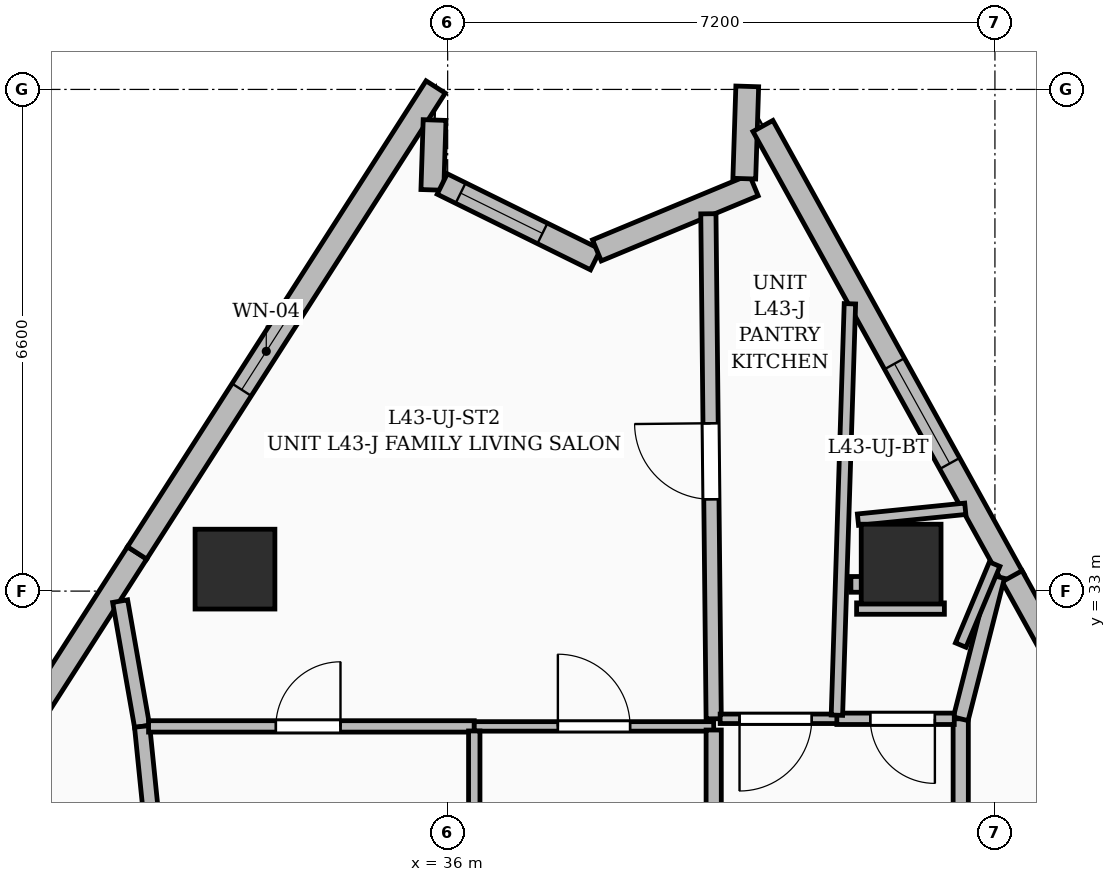
"""IFC4 building model, lengths in metres.
Left out: names, types, materials, properties, quantities, classifications, styles, units other than length and angle.
Written with IfcOpenShell. Run it as: python <this file> out.ifc"""

import sys

from ifc_helpers import new_model, si_unit, direction, frame, frame_2d, origin, origin_2d, place, context, subcontext, project, spatial, rectangle, extrude, element, fill, save


model = new_model("IFC4")
c1 = context("Model", 3, precision=1e-05, world=origin(), true_north=direction((0.0, 1.0)))
c2 = subcontext(c1, "Body", "Model", "MODEL_VIEW")
j1 = project(units=[si_unit("LENGTHUNIT", "METRE"), si_unit("PLANEANGLEUNIT", "RADIAN")], contexts=[c1])
p1 = place(None, origin())
s1 = spatial("IfcSite", under=j1, at=p1, CompositionType="ELEMENT")
p2 = place(p1, origin())
s2 = spatial("IfcBuilding", under=s1, at=p2, CompositionType="ELEMENT")
p3 = place(p2, frame((0.0, 0.0, 168.0)))
s3 = spatial("IfcBuildingStorey", under=s2, at=p3, CompositionType="ELEMENT", Elevation=168.0)
for number, where, z_axis, x_axis in (
    (1, (41.966, 33.355, 0.0), (0.0, 0.0, 1.0), (1.0, 0.0, 0.0)),
    (2, (33.202, 33.289, 0.0), (0.0, 0.0, 1.0), (1.0, 0.0, 0.0)),
):
    element("IfcColumn", number, at=place(p3, frame(where, z_axis=z_axis, x_axis=x_axis)), inside=s3, PredefinedType="COLUMN", context=c2, shape_type="SweptSolid", body=[
        extrude(rectangle(XDim=1.05, YDim=1.05, at=origin_2d()), origin(), (0.0, 0.0, 1.0), 3.6),
    ])
p4 = place(p3, frame((27.986, 27.373, 0.0), z_axis=(0.0, 0.0, 1.0), x_axis=(0.539557017358, 0.841949063198, 0.0)))
e3 = element("IfcWall", 3, at=p4, inside=s3, PredefinedType="SOLIDWALL", context=c2, shape_type="SweptSolid", body=[
    extrude(rectangle(XDim=7.28, YDim=0.3, at=frame_2d((3.64, 0.0))), origin(), (0.0, 0.0, 1.0), 3.35),
])
p5 = place(p4, frame((0.9, 0.0, 0.6)))
e4 = element("IfcOpeningElement", 4, at=p5, cuts=e3, PredefinedType="OPENING", context=c2, shape_type="SweptSolid", body=[
    extrude(rectangle(XDim=1.5, YDim=2.1, at=frame_2d((0.75, 1.05))), frame((0.0, 0.16, 0.0), z_axis=(0.0, -1.0, 0.0), x_axis=(1.0, 0.0, 0.0)), (0.0, 0.0, 1.0), 0.32),
])
p6 = place(p3, frame((31.914, 33.502, 0.0), z_axis=(0.0, 0.0, 1.0), x_axis=(0.539526549497, 0.84196858753, 0.0)))
e5 = element("IfcWall", 5, at=p6, inside=s3, PredefinedType="SOLIDWALL", context=c2, shape_type="SweptSolid", body=[
    extrude(rectangle(XDim=7.281, YDim=0.3, at=frame_2d((3.64, 0.0))), origin(), (0.0, 0.0, 1.0), 3.35),
])
p7 = place(p6, frame((2.55, 0.0, 0.8)))
e6 = element("IfcOpeningElement", 6, at=p7, cuts=e5, PredefinedType="OPENING", context=c2, shape_type="SweptSolid", body=[
    extrude(rectangle(XDim=1.2, YDim=1.8, at=frame_2d((0.6, 0.9))), frame((0.0, 0.16, 0.0), z_axis=(0.0, -1.0, 0.0), x_axis=(1.0, 0.0, 0.0)), (0.0, 0.0, 1.0), 0.32),
])
p8 = place(p3, frame((35.828, 39.197, 0.0), z_axis=(0.0, 0.0, 1.0), x_axis=(-0.03185633333, -0.999492458214, 0.0)))
e7 = element("IfcWall", 7, at=p8, inside=s3, PredefinedType="SOLIDWALL", context=c2, shape_type="SweptSolid", body=[
    extrude(rectangle(XDim=0.92, YDim=0.3, at=frame_2d((0.46, 0.0))), origin(), (0.0, 0.0, 1.0), 3.35),
])
p9 = place(p3, frame((35.928, 38.356, 0.0), z_axis=(0.0, 0.0, 1.0), x_axis=(0.896845505116, -0.442343915922, 0.0)))
e8 = element("IfcWall", 8, at=p9, inside=s3, PredefinedType="SOLIDWALL", context=c2, shape_type="SweptSolid", body=[
    extrude(rectangle(XDim=2.249, YDim=0.3, at=frame_2d((1.125, 0.0))), origin(), (0.0, 0.0, 1.0), 3.35),
])
p10 = place(p9, frame((0.27, 0.0, 0.8)))
e9 = element("IfcOpeningElement", 9, at=p10, cuts=e8, PredefinedType="OPENING", context=c2, shape_type="SweptSolid", body=[
    extrude(rectangle(XDim=1.2, YDim=1.8, at=frame_2d((0.6, 0.9))), frame((0.0, 0.16, 0.0), z_axis=(0.0, -1.0, 0.0), x_axis=(1.0, 0.0, 0.0)), (0.0, 0.0, 1.0), 0.32),
])
p11 = place(p3, frame((37.963, 37.482, 0.0), z_axis=(0.0, 0.0, 1.0), x_axis=(0.923538383056, 0.383506003892, 0.0)))
e10 = element("IfcWall", 10, at=p11, inside=s3, PredefinedType="SOLIDWALL", context=c2, shape_type="SweptSolid", body=[
    extrude(rectangle(XDim=2.235, YDim=0.3, at=frame_2d((1.118, 0.0))), origin(), (0.0, 0.0, 1.0), 3.35),
])
p12 = place(p3, frame((39.903, 38.426, 0.0), z_axis=(0.0, 0.0, 1.0), x_axis=(0.031962743503, 0.999489060985, 0.0)))
e11 = element("IfcWall", 11, at=p12, inside=s3, PredefinedType="SOLIDWALL", context=c2, shape_type="SweptSolid", body=[
    extrude(rectangle(XDim=1.215, YDim=0.3, at=frame_2d((0.607, 0.0))), origin(), (0.0, 0.0, 1.0), 3.35),
])
p13 = place(p3, frame((40.148, 39.119, 0.0), z_axis=(0.0, 0.0, 1.0), x_axis=(0.484162803577, -0.87497793094, 0.0)))
e12 = element("IfcWall", 12, at=p13, inside=s3, PredefinedType="SOLIDWALL", context=c2, shape_type="SweptSolid", body=[
    extrude(rectangle(XDim=6.823, YDim=0.3, at=frame_2d((3.412, 0.0))), origin(), (0.0, 0.0, 1.0), 3.35),
])
p14 = place(p13, frame((3.575, 0.0, 0.6)))
e13 = element("IfcOpeningElement", 13, at=p14, cuts=e12, PredefinedType="OPENING", context=c2, shape_type="SweptSolid", body=[
    extrude(rectangle(XDim=1.5, YDim=2.1, at=frame_2d((0.75, 1.05))), frame((0.0, 0.16, 0.0), z_axis=(0.0, -1.0, 0.0), x_axis=(1.0, 0.0, 0.0)), (0.0, 0.0, 1.0), 0.32),
])
p15 = place(p3, frame((43.426, 33.195, 0.0), z_axis=(0.0, 0.0, 1.0), x_axis=(0.484187348611, -0.874964348671, 0.0)))
e14 = element("IfcWall", 14, at=p15, inside=s3, PredefinedType="SOLIDWALL", context=c2, shape_type="SweptSolid", body=[
    extrude(rectangle(XDim=7.451, YDim=0.3, at=frame_2d((3.726, 0.0))), origin(), (0.0, 0.0, 1.0), 3.35),
])
p16 = place(p15, frame((3.103, 0.0, 0.8)))
e15 = element("IfcOpeningElement", 15, at=p16, cuts=e14, PredefinedType="OPENING", context=c2, shape_type="SweptSolid", body=[
    extrude(rectangle(XDim=1.2, YDim=1.8, at=frame_2d((0.6, 0.9))), frame((0.0, 0.16, 0.0), z_axis=(0.0, -1.0, 0.0), x_axis=(1.0, 0.0, 0.0)), (0.0, 0.0, 1.0), 0.32),
])
p17 = place(p3, frame((31.98, 31.22, 0.0), z_axis=(0.0, 0.0, 1.0), x_axis=(-0.17276967515, 0.984962252753, 0.0)))
e16 = element("IfcWall", 16, at=p17, inside=s3, PredefinedType="PARTITIONING", context=c2, shape_type="SweptSolid", body=[
    extrude(rectangle(XDim=1.673, YDim=0.2, at=frame_2d((0.836, 0.0))), origin(), (0.0, 0.0, 1.0), 2.57),
])
p18 = place(p3, frame((32.18, 29.25, 0.0), z_axis=(0.0, 0.0, 1.0), x_axis=(-0.100980739114, 0.994888380839, 0.0)))
e17 = element("IfcWall", 17, at=p18, inside=s3, PredefinedType="PARTITIONING", context=c2, shape_type="SweptSolid", body=[
    extrude(rectangle(XDim=1.98, YDim=0.2, at=frame_2d((0.99, 0.0))), origin(), (0.0, 0.0, 1.0), 2.57),
])
p19 = place(p3, frame((42.75, 31.32, 0.0), z_axis=(0.0, 0.0, 1.0), x_axis=(0.0, -1.0, 0.0)))
e18 = element("IfcWall", 18, at=p19, inside=s3, PredefinedType="PARTITIONING", context=c2, shape_type="SweptSolid", body=[
    extrude(rectangle(XDim=7.035, YDim=0.2, at=frame_2d((3.518, 0.0))), origin(), (0.0, 0.0, 1.0), 2.393),
])
p20 = place(p3, frame((43.228, 33.192, 0.0), z_axis=(0.0, 0.0, 1.0), x_axis=(-0.247320136716, -0.968933821257, 0.0)))
e19 = element("IfcWall", 19, at=p20, inside=s3, PredefinedType="PARTITIONING", context=c2, shape_type="SweptSolid", body=[
    extrude(rectangle(XDim=1.932, YDim=0.2, at=frame_2d((0.966, 0.0))), origin(), (0.0, 0.0, 1.0), 2.57),
])
p21 = place(p3, frame((32.065, 31.22, 0.0), z_axis=(0.0, 0.0, 1.0), x_axis=(1.0, 0.0, 0.0)))
e20 = element("IfcWall", 20, at=p21, inside=s3, PredefinedType="PARTITIONING", context=c2, shape_type="SweptSolid", body=[
    extrude(rectangle(XDim=4.285, YDim=0.15, at=frame_2d((2.143, 0.0))), origin(), (0.0, 0.0, 1.0), 2.393),
])
p22 = place(p21, frame((1.675, 0.0, 0.0)))
e21 = element("IfcOpeningElement", 21, at=p22, cuts=e20, PredefinedType="OPENING", context=c2, shape_type="SweptSolid", body=[
    extrude(rectangle(XDim=0.85, YDim=2.1, at=frame_2d((0.425, 1.05))), frame((0.0, 0.085, 0.0), z_axis=(0.0, -1.0, 0.0), x_axis=(1.0, 0.0, 0.0)), (0.0, 0.0, 1.0), 0.17),
])
p23 = place(p3, frame((36.35, 31.22, 0.0), z_axis=(0.0, 0.0, 1.0), x_axis=(1.0, 0.0, 0.0)))
e22 = element("IfcWall", 22, at=p23, inside=s3, PredefinedType="PARTITIONING", context=c2, shape_type="SweptSolid", body=[
    extrude(rectangle(XDim=3.15, YDim=0.125, at=frame_2d((1.575, 0.0))), origin(), (0.0, 0.0, 1.0), 2.771),
])
p24 = place(p23, frame((1.1, 0.0, 0.0)))
e23 = element("IfcOpeningElement", 23, at=p24, cuts=e22, PredefinedType="OPENING", context=c2, shape_type="SweptSolid", body=[
    extrude(rectangle(XDim=0.95, YDim=2.2, at=frame_2d((0.475, 1.1))), frame((0.0, 0.072, 0.0), z_axis=(0.0, -1.0, 0.0), x_axis=(1.0, 0.0, 0.0)), (0.0, 0.0, 1.0), 0.145),
])
p25 = place(p3, frame((39.5, 31.32, 0.0), z_axis=(0.0, 0.0, 1.0), x_axis=(-0.010545456067, 0.999944395132, 0.0)))
e24 = element("IfcWall", 24, at=p25, inside=s3, PredefinedType="PARTITIONING", context=c2, shape_type="SweptSolid", body=[
    extrude(rectangle(XDim=6.645, YDim=0.2, at=frame_2d((3.322, 0.0))), origin(), (0.0, 0.0, 1.0), 2.57),
])
p26 = place(p25, frame((2.889, 0.0, 0.0)))
e25 = element("IfcOpeningElement", 25, at=p26, cuts=e24, PredefinedType="OPENING", context=c2, shape_type="SweptSolid", body=[
    extrude(rectangle(XDim=1.0, YDim=2.2, at=frame_2d((0.5, 1.1))), frame((0.0, 0.11, 0.0), z_axis=(0.0, -1.0, 0.0), x_axis=(1.0, 0.0, 0.0)), (0.0, 0.0, 1.0), 0.22),
])
p27 = place(p3, frame((36.35, 26.42, 0.0), z_axis=(0.0, 0.0, 1.0), x_axis=(0.0, 1.0, 0.0)))
e26 = element("IfcWall", 26, at=p27, inside=s3, PredefinedType="PARTITIONING", context=c2, shape_type="SweptSolid", body=[
    extrude(rectangle(XDim=4.74, YDim=0.15, at=frame_2d((2.37, 0.0))), origin(), (0.0, 0.0, 1.0), 2.393),
])
p28 = place(p3, frame((39.5, 22.015, 0.0), z_axis=(0.0, 0.0, 1.0), x_axis=(0.0, 1.0, 0.0)))
e27 = element("IfcWall", 27, at=p28, inside=s3, PredefinedType="PARTITIONING", context=c2, shape_type="SweptSolid", body=[
    extrude(rectangle(XDim=9.158, YDim=0.2, at=frame_2d((4.579, 0.0))), origin(), (0.0, 0.0, 1.0), 2.436),
])
p29 = place(p3, frame((41.13, 31.32, 0.0), z_axis=(0.0, 0.0, 1.0), x_axis=(-1.0, 0.0, 0.0)))
e28 = element("IfcWall", 28, at=p29, inside=s3, PredefinedType="PARTITIONING", context=c2, shape_type="SweptSolid", body=[
    extrude(rectangle(XDim=1.545, YDim=0.125, at=frame_2d((0.772, 0.0))), origin(), (0.0, 0.0, 1.0), 3.35),
])
p30 = place(p29, frame((0.34, 0.0, 0.0)))
e29 = element("IfcOpeningElement", 29, at=p30, cuts=e28, PredefinedType="OPENING", context=c2, shape_type="SweptSolid", body=[
    extrude(rectangle(XDim=0.95, YDim=2.2, at=frame_2d((0.475, 1.1))), frame((0.0, 0.072, 0.0), z_axis=(0.0, -1.0, 0.0), x_axis=(1.0, 0.0, 0.0)), (0.0, 0.0, 1.0), 0.145),
])
p31 = place(p3, frame((42.665, 31.32, 0.0), z_axis=(0.0, 0.0, 1.0), x_axis=(-1.0, 0.0, 0.0)))
e30 = element("IfcWall", 30, at=p31, inside=s3, PredefinedType="PARTITIONING", context=c2, shape_type="SweptSolid", body=[
    extrude(rectangle(XDim=1.545, YDim=0.15, at=frame_2d((0.772, 0.0))), origin(), (0.0, 0.0, 1.0), 2.393),
])
p32 = place(p31, frame((0.255, 0.0, 0.0)))
e31 = element("IfcOpeningElement", 31, at=p32, cuts=e30, PredefinedType="OPENING", context=c2, shape_type="SweptSolid", body=[
    extrude(rectangle(XDim=0.85, YDim=2.1, at=frame_2d((0.425, 1.05))), frame((0.0, 0.085, 0.0), z_axis=(0.0, -1.0, 0.0), x_axis=(1.0, 0.0, 0.0)), (0.0, 0.0, 1.0), 0.17),
])
p33 = place(p3, frame((41.121, 31.367, 0.0), z_axis=(0.0, 0.0, 1.0), x_axis=(0.031558472492, 0.999501907359, 0.0)))
e32 = element("IfcWall", 32, at=p33, inside=s3, PredefinedType="PARTITIONING", context=c2, shape_type="SweptSolid", body=[
    extrude(rectangle(XDim=5.415, YDim=0.15, at=frame_2d((2.708, 0.0))), origin(), (0.0, 0.0, 1.0), 2.57),
])
p34 = place(p3, frame((42.75, 32.29, 0.0), z_axis=(0.0, 0.0, 1.0), x_axis=(0.38662798091, 0.922235763987, 0.0)))
e33 = element("IfcWall", 33, at=p34, inside=s3, PredefinedType="PARTITIONING", context=c2, shape_type="SweptSolid", body=[
    extrude(rectangle(XDim=1.154, YDim=0.15, at=frame_2d((0.577, 0.0))), origin(), (0.0, 0.0, 1.0), 2.57),
])
p35 = place(p3, frame((42.535, 32.77, 0.0), z_axis=(0.0, 0.0, 1.0), x_axis=(-1.0, 0.0, 0.0)))
e34 = element("IfcWall", 34, at=p35, inside=s3, PredefinedType="PARTITIONING", context=c2, shape_type="SweptSolid", body=[
    extrude(rectangle(XDim=1.155, YDim=0.15, at=frame_2d((0.578, 0.0))), origin(), (0.0, 0.0, 1.0), 2.393),
])
p36 = place(p3, frame((41.38, 32.985, 0.0), z_axis=(0.0, 0.0, 1.0), x_axis=(0.0, 1.0, 0.0)))
e35 = element("IfcWall", 35, at=p36, inside=s3, PredefinedType="PARTITIONING", context=c2, shape_type="SweptSolid", body=[
    extrude(rectangle(XDim=0.207, YDim=0.15, at=frame_2d((0.104, 0.0))), origin(), (0.0, 0.0, 1.0), 2.57),
])
p37 = place(p3, frame((41.398, 33.94, 0.0), z_axis=(0.0, 0.0, 1.0), x_axis=(0.994906914974, 0.10079796891, 0.0)))
e36 = element("IfcWall", 36, at=p37, inside=s3, PredefinedType="PARTITIONING", context=c2, shape_type="SweptSolid", body=[
    extrude(rectangle(XDim=1.419, YDim=0.15, at=frame_2d((0.71, 0.0))), origin(), (0.0, 0.0, 1.0), 3.35),
])
p38 = place(p7, origin())
e37 = element("IfcWindow", 37, at=p38, inside=s3, PartitioningType="SINGLE_PANEL", PredefinedType="WINDOW", context=c2, shape_type="SweptSolid", body=[
    extrude(rectangle(XDim=1.2, YDim=1.8, at=frame_2d((0.6, 0.9))), frame((0.0, 0.03, 0.0), z_axis=(0.0, -1.0, 0.0), x_axis=(1.0, 0.0, 0.0)), (0.0, 0.0, 1.0), 0.06),
])
fill(e6, e37)
p39 = place(p10, origin())
e38 = element("IfcWindow", 38, at=p39, inside=s3, PartitioningType="SINGLE_PANEL", PredefinedType="WINDOW", context=c2, shape_type="SweptSolid", body=[
    extrude(rectangle(XDim=1.2, YDim=1.8, at=frame_2d((0.6, 0.9))), frame((0.0, 0.03, 0.0), z_axis=(0.0, -1.0, 0.0), x_axis=(1.0, 0.0, 0.0)), (0.0, 0.0, 1.0), 0.06),
])
fill(e9, e38)
p40 = place(p14, origin())
e39 = element("IfcWindow", 39, at=p40, inside=s3, PartitioningType="SINGLE_PANEL", PredefinedType="WINDOW", context=c2, shape_type="SweptSolid", body=[
    extrude(rectangle(XDim=1.5, YDim=2.1, at=frame_2d((0.75, 1.05))), frame((0.0, 0.03, 0.0), z_axis=(0.0, -1.0, 0.0), x_axis=(1.0, 0.0, 0.0)), (0.0, 0.0, 1.0), 0.06),
])
fill(e13, e39)
p41 = place(p24, origin())
e40 = element("IfcDoor", 40, at=p41, inside=s3, OperationType="SINGLE_SWING_LEFT", PredefinedType="DOOR", context=c2, shape_type="SweptSolid", body=[
    extrude(rectangle(XDim=0.95, YDim=2.2, at=frame_2d((0.475, 1.1))), frame((0.0, 0.025, 0.0), z_axis=(0.0, -1.0, 0.0), x_axis=(1.0, 0.0, 0.0)), (0.0, 0.0, 1.0), 0.05),
])
fill(e23, e40)
p42 = place(p22, origin())
e41 = element("IfcDoor", 41, at=p42, inside=s3, OperationType="SINGLE_SWING_RIGHT", PredefinedType="DOOR", context=c2, shape_type="SweptSolid", body=[
    extrude(rectangle(XDim=0.85, YDim=2.1, at=frame_2d((0.425, 1.05))), frame((0.0, 0.025, 0.0), z_axis=(0.0, -1.0, 0.0), x_axis=(1.0, 0.0, 0.0)), (0.0, 0.0, 1.0), 0.05),
])
fill(e21, e41)
p43 = place(p30, origin())
e42 = element("IfcDoor", 42, at=p43, inside=s3, OperationType="SINGLE_SWING_RIGHT", PredefinedType="DOOR", context=c2, shape_type="SweptSolid", body=[
    extrude(rectangle(XDim=0.95, YDim=2.2, at=frame_2d((0.475, 1.1))), frame((0.0, 0.025, 0.0), z_axis=(0.0, -1.0, 0.0), x_axis=(1.0, 0.0, 0.0)), (0.0, 0.0, 1.0), 0.05),
])
fill(e29, e42)
p44 = place(p32, origin())
e43 = element("IfcDoor", 43, at=p44, inside=s3, OperationType="SINGLE_SWING_LEFT", PredefinedType="DOOR", context=c2, shape_type="SweptSolid", body=[
    extrude(rectangle(XDim=0.85, YDim=2.1, at=frame_2d((0.425, 1.05))), frame((0.0, 0.025, 0.0), z_axis=(0.0, -1.0, 0.0), x_axis=(1.0, 0.0, 0.0)), (0.0, 0.0, 1.0), 0.05),
])
fill(e31, e43)
p45 = place(p26, origin())
e44 = element("IfcDoor", 44, at=p45, inside=s3, OperationType="SINGLE_SWING_RIGHT", PredefinedType="DOOR", context=c2, shape_type="SweptSolid", body=[
    extrude(rectangle(XDim=1.0, YDim=2.2, at=frame_2d((0.5, 1.1))), frame((0.0, 0.025, 0.0), z_axis=(0.0, -1.0, 0.0), x_axis=(1.0, 0.0, 0.0)), (0.0, 0.0, 1.0), 0.05),
])
fill(e25, e44)
save(model, sys.argv[1])
